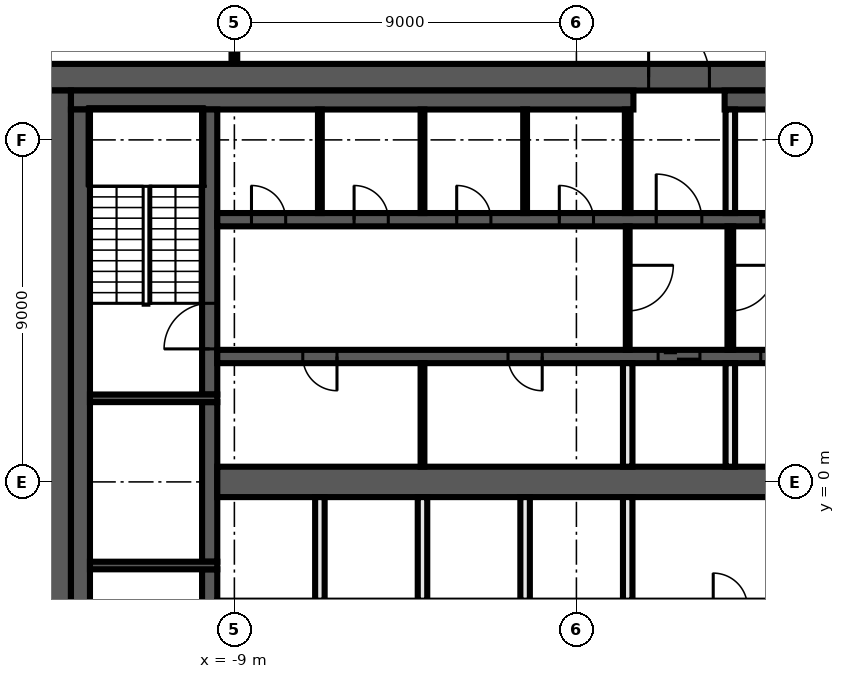
"""IFC4 building model, lengths in metres.
Left out: names, types, materials, properties, quantities, classifications, styles, units other than length and angle.
Written with IfcOpenShell. Run it as: python <this file> out.ifc"""

import sys

from ifc_helpers import new_model, si_unit, direction, frame, frame_2d, origin, place, context, subcontext, project, spatial, rectangle, extrude, element, fill, save


model = new_model("IFC4")
c1 = context("Model", 3, precision=1e-05, world=origin(), true_north=direction((0.0, 1.0)))
c2 = subcontext(c1, "Body", "Model", "MODEL_VIEW")
j1 = project(units=[si_unit("LENGTHUNIT", "METRE"), si_unit("PLANEANGLEUNIT", "RADIAN")], contexts=[c1])
p1 = place(None, origin())
s1 = spatial("IfcSite", under=j1, at=p1, CompositionType="ELEMENT")
p2 = place(p1, origin())
s2 = spatial("IfcBuilding", under=s1, at=p2, CompositionType="ELEMENT")
p3 = place(p2, frame((0.0, 0.0, 249.6)))
s3 = spatial("IfcBuildingStorey", under=s2, at=p3, CompositionType="ELEMENT", Elevation=249.6)
p4 = place(p3, frame((-9.0, 11.0, 0.0), z_axis=(0.0, 0.0, 1.0), x_axis=(0.0, 1.0, 0.0)))
e1 = element("IfcWall", 1, at=p4, inside=s3, PredefinedType="PARTITIONING", context=c2, shape_type="SweptSolid", body=[
    extrude(rectangle(XDim=2.925, YDim=0.15, at=frame_2d((1.462, 0.0))), origin(), (0.0, 0.0, 1.0), 3.82),
])
p5 = place(p3, frame((-14.0, 10.65, 0.0), z_axis=(0.0, 0.0, 1.0), x_axis=(1.0, 0.0, 0.0)))
e2 = element("IfcWall", 2, at=p5, inside=s3, PredefinedType="SHEAR", context=c2, shape_type="SweptSolid", body=[
    extrude(rectangle(XDim=28.0, YDim=0.7, at=frame_2d((14.0, 0.0))), origin(), (0.0, 0.0, 1.0), 3.82),
])
p6 = place(p5, frame((15.9, 0.0, 0.0)))
e3 = element("IfcOpeningElement", 3, at=p6, cuts=e2, PredefinedType="OPENING", context=c2, shape_type="SweptSolid", body=[
    extrude(rectangle(XDim=1.6, YDim=2.1, at=frame_2d((0.8, 1.05))), frame((0.0, 0.36, 0.0), z_axis=(0.0, -1.0, 0.0), x_axis=(1.0, 0.0, 0.0)), (0.0, 0.0, 1.0), 0.72),
])
p7 = place(p3, frame((-13.65, -10.3, 0.0), z_axis=(0.0, 0.0, 1.0), x_axis=(0.0, 1.0, 0.0)))
e4 = element("IfcWall", 4, at=p7, inside=s3, PredefinedType="SHEAR", context=c2, shape_type="SweptSolid", body=[
    extrude(rectangle(XDim=20.6, YDim=0.7, at=frame_2d((10.3, 0.0))), origin(), (0.0, 0.0, 1.0), 3.82),
])
p8 = place(p3, frame((-13.3, 10.05, 0.0), z_axis=(0.0, 0.0, 1.0), x_axis=(1.0, 0.0, 0.0)))
e5 = element("IfcWall", 5, at=p8, inside=s3, PredefinedType="SHEAR", context=c2, shape_type="SweptSolid", body=[
    extrude(rectangle(XDim=14.8, YDim=0.5, at=frame_2d((7.4, 0.0))), origin(), (0.0, 0.0, 1.0), 3.82),
])
p9 = place(p3, frame((3.9, 10.05, 0.0), z_axis=(0.0, 0.0, 1.0), x_axis=(1.0, 0.0, 0.0)))
e6 = element("IfcWall", 6, at=p9, inside=s3, PredefinedType="SHEAR", context=c2, shape_type="SweptSolid", body=[
    extrude(rectangle(XDim=9.4, YDim=0.5, at=frame_2d((4.7, 0.0))), origin(), (0.0, 0.0, 1.0), 3.82),
])
p10 = place(p3, frame((-13.05, -9.8, 0.0), z_axis=(0.0, 0.0, 1.0), x_axis=(0.0, 1.0, 0.0)))
e7 = element("IfcWall", 7, at=p10, inside=s3, PredefinedType="SHEAR", context=c2, shape_type="SweptSolid", body=[
    extrude(rectangle(XDim=19.6, YDim=0.5, at=frame_2d((9.8, 0.0))), origin(), (0.0, 0.0, 1.0), 3.82),
])
p11 = place(p3, frame((-9.65, -9.8, 0.0), z_axis=(0.0, 0.0, 1.0), x_axis=(0.0, 1.0, 0.0)))
e8 = element("IfcWall", 8, at=p11, inside=s3, PredefinedType="SHEAR", context=c2, shape_type="SweptSolid", body=[
    extrude(rectangle(XDim=7.5, YDim=0.4, at=frame_2d((3.75, 0.0))), origin(), (0.0, 0.0, 1.0), 3.82),
])
p12 = place(p11, frame((5.1, 0.0, 0.0)))
e9 = element("IfcOpeningElement", 9, at=p12, cuts=e8, PredefinedType="OPENING", context=c2, shape_type="SweptSolid", body=[
    extrude(rectangle(XDim=1.2, YDim=2.1, at=frame_2d((0.6, 1.05))), frame((0.0, 0.21, 0.0), z_axis=(0.0, -1.0, 0.0), x_axis=(1.0, 0.0, 0.0)), (0.0, 0.0, 1.0), 0.42),
])
p13 = place(p3, frame((-9.65, -2.1, 0.0), z_axis=(0.0, 0.0, 1.0), x_axis=(0.0, 1.0, 0.0)))
e10 = element("IfcWall", 10, at=p13, inside=s3, PredefinedType="SHEAR", context=c2, shape_type="SweptSolid", body=[
    extrude(rectangle(XDim=4.2, YDim=0.4, at=frame_2d((2.1, 0.0))), origin(), (0.0, 0.0, 1.0), 3.82),
])
p14 = place(p3, frame((-9.65, 2.3, 0.0), z_axis=(0.0, 0.0, 1.0), x_axis=(0.0, 1.0, 0.0)))
e11 = element("IfcWall", 11, at=p14, inside=s3, PredefinedType="SHEAR", context=c2, shape_type="SweptSolid", body=[
    extrude(rectangle(XDim=7.5, YDim=0.4, at=frame_2d((3.75, 0.0))), origin(), (0.0, 0.0, 1.0), 3.82),
])
p15 = place(p14, frame((1.2, 0.0, 0.0)))
e12 = element("IfcOpeningElement", 12, at=p15, cuts=e11, PredefinedType="OPENING", context=c2, shape_type="SweptSolid", body=[
    extrude(rectangle(XDim=1.2, YDim=2.1, at=frame_2d((0.6, 1.05))), frame((0.0, 0.21, 0.0), z_axis=(0.0, -1.0, 0.0), x_axis=(1.0, 0.0, 0.0)), (0.0, 0.0, 1.0), 0.42),
])
for number, where, z_axis, x_axis in (
    (13, (-9.45, 2.2, 0.0), (0.0, 0.0, 1.0), (-1.0, 0.0, 0.0)),
    (14, (-9.45, -2.2, 0.0), (0.0, 0.0, 1.0), (-1.0, 0.0, 0.0)),
):
    element("IfcWall", number, at=place(p3, frame(where, z_axis=z_axis, x_axis=x_axis)), inside=s3, PredefinedType="SHEAR", context=c2, shape_type="SweptSolid", body=[
        extrude(rectangle(XDim=3.35, YDim=0.2, at=frame_2d((1.675, 0.0))), origin(), (0.0, 0.0, 1.0), 3.82),
    ])
p16 = place(p3, frame((-9.45, 6.9, 0.0), z_axis=(0.0, 0.0, 1.0), x_axis=(1.0, 0.0, 0.0)))
e15 = element("IfcWall", 15, at=p16, inside=s3, PredefinedType="SHEAR", context=c2, shape_type="SweptSolid", body=[
    extrude(rectangle(XDim=18.9, YDim=0.35, at=frame_2d((9.45, 0.0))), origin(), (0.0, 0.0, 1.0), 3.82),
])
p17 = place(p16, frame((11.55, 0.0, 0.0)))
e16 = element("IfcOpeningElement", 16, at=p17, cuts=e15, PredefinedType="OPENING", context=c2, shape_type="SweptSolid", body=[
    extrude(rectangle(XDim=1.2, YDim=2.1, at=frame_2d((0.6, 1.05))), frame((0.0, 0.185, 0.0), z_axis=(0.0, -1.0, 0.0), x_axis=(1.0, 0.0, 0.0)), (0.0, 0.0, 1.0), 0.37),
])
p18 = place(p16, frame((14.3, 0.0, 0.0)))
e17 = element("IfcOpeningElement", 17, at=p18, cuts=e15, PredefinedType="OPENING", context=c2, shape_type="SweptSolid", body=[
    extrude(rectangle(XDim=1.1, YDim=2.1, at=frame_2d((0.55, 1.05))), frame((0.0, 0.185, 0.0), z_axis=(0.0, -1.0, 0.0), x_axis=(1.0, 0.0, 0.0)), (0.0, 0.0, 1.0), 0.37),
])
p19 = place(p16, frame((17.0, 0.0, 0.0)))
e18 = element("IfcOpeningElement", 18, at=p19, cuts=e15, PredefinedType="OPENING", context=c2, shape_type="SweptSolid", body=[
    extrude(rectangle(XDim=1.1, YDim=2.1, at=frame_2d((0.55, 1.05))), frame((0.0, 0.185, 0.0), z_axis=(0.0, -1.0, 0.0), x_axis=(1.0, 0.0, 0.0)), (0.0, 0.0, 1.0), 0.37),
])
p20 = place(p16, frame((0.9, 0.0, 0.0)))
e19 = element("IfcOpeningElement", 19, at=p20, cuts=e15, PredefinedType="OPENING", context=c2, shape_type="SweptSolid", body=[
    extrude(rectangle(XDim=0.9, YDim=2.1, at=frame_2d((0.45, 1.05))), frame((0.0, 0.185, 0.0), z_axis=(0.0, -1.0, 0.0), x_axis=(1.0, 0.0, 0.0)), (0.0, 0.0, 1.0), 0.37),
])
p21 = place(p16, frame((3.6, 0.0, 0.0)))
e20 = element("IfcOpeningElement", 20, at=p21, cuts=e15, PredefinedType="OPENING", context=c2, shape_type="SweptSolid", body=[
    extrude(rectangle(XDim=0.9, YDim=2.1, at=frame_2d((0.45, 1.05))), frame((0.0, 0.185, 0.0), z_axis=(0.0, -1.0, 0.0), x_axis=(1.0, 0.0, 0.0)), (0.0, 0.0, 1.0), 0.37),
])
p22 = place(p16, frame((6.3, 0.0, 0.0)))
e21 = element("IfcOpeningElement", 21, at=p22, cuts=e15, PredefinedType="OPENING", context=c2, shape_type="SweptSolid", body=[
    extrude(rectangle(XDim=0.9, YDim=2.1, at=frame_2d((0.45, 1.05))), frame((0.0, 0.185, 0.0), z_axis=(0.0, -1.0, 0.0), x_axis=(1.0, 0.0, 0.0)), (0.0, 0.0, 1.0), 0.37),
])
p23 = place(p16, frame((9.0, 0.0, 0.0)))
e22 = element("IfcOpeningElement", 22, at=p23, cuts=e15, PredefinedType="OPENING", context=c2, shape_type="SweptSolid", body=[
    extrude(rectangle(XDim=0.9, YDim=2.1, at=frame_2d((0.45, 1.05))), frame((0.0, 0.185, 0.0), z_axis=(0.0, -1.0, 0.0), x_axis=(1.0, 0.0, 0.0)), (0.0, 0.0, 1.0), 0.37),
])
p24 = place(p3, frame((9.45, 3.3, 0.0), z_axis=(0.0, 0.0, 1.0), x_axis=(-1.0, 0.0, 0.0)))
e23 = element("IfcWall", 23, at=p24, inside=s3, PredefinedType="SHEAR", context=c2, shape_type="SweptSolid", body=[
    extrude(rectangle(XDim=18.9, YDim=0.35, at=frame_2d((9.45, 0.0))), origin(), (0.0, 0.0, 1.0), 3.82),
])
p25 = place(p24, frame((6.2, 0.0, 0.0)))
e24 = element("IfcOpeningElement", 24, at=p25, cuts=e23, PredefinedType="OPENING", context=c2, shape_type="SweptSolid", body=[
    extrude(rectangle(XDim=1.1, YDim=2.1, at=frame_2d((0.55, 1.05))), frame((0.0, 0.185, 0.0), z_axis=(0.0, -1.0, 0.0), x_axis=(1.0, 0.0, 0.0)), (0.0, 0.0, 1.0), 0.37),
])
p26 = place(p24, frame((3.5, 0.0, 0.0)))
e25 = element("IfcOpeningElement", 25, at=p26, cuts=e23, PredefinedType="OPENING", context=c2, shape_type="SweptSolid", body=[
    extrude(rectangle(XDim=1.1, YDim=2.1, at=frame_2d((0.55, 1.05))), frame((0.0, 0.185, 0.0), z_axis=(0.0, -1.0, 0.0), x_axis=(1.0, 0.0, 0.0)), (0.0, 0.0, 1.0), 0.37),
])
p27 = place(p24, frame((0.9, 0.0, 0.0)))
e26 = element("IfcOpeningElement", 26, at=p27, cuts=e23, PredefinedType="OPENING", context=c2, shape_type="SweptSolid", body=[
    extrude(rectangle(XDim=0.9, YDim=2.1, at=frame_2d((0.45, 1.05))), frame((0.0, 0.185, 0.0), z_axis=(0.0, -1.0, 0.0), x_axis=(1.0, 0.0, 0.0)), (0.0, 0.0, 1.0), 0.37),
])
p28 = place(p24, frame((15.75, 0.0, 0.0)))
e27 = element("IfcOpeningElement", 27, at=p28, cuts=e23, PredefinedType="OPENING", context=c2, shape_type="SweptSolid", body=[
    extrude(rectangle(XDim=0.9, YDim=2.1, at=frame_2d((0.45, 1.05))), frame((0.0, 0.185, 0.0), z_axis=(0.0, -1.0, 0.0), x_axis=(1.0, 0.0, 0.0)), (0.0, 0.0, 1.0), 0.37),
])
p29 = place(p24, frame((10.35, 0.0, 0.0)))
e28 = element("IfcOpeningElement", 28, at=p29, cuts=e23, PredefinedType="OPENING", context=c2, shape_type="SweptSolid", body=[
    extrude(rectangle(XDim=0.9, YDim=2.1, at=frame_2d((0.45, 1.05))), frame((0.0, 0.185, 0.0), z_axis=(0.0, -1.0, 0.0), x_axis=(1.0, 0.0, 0.0)), (0.0, 0.0, 1.0), 0.37),
])
p30 = place(p3, frame((-9.45, 0.0, 0.0), z_axis=(0.0, 0.0, 1.0), x_axis=(1.0, 0.0, 0.0)))
e29 = element("IfcWall", 29, at=p30, inside=s3, PredefinedType="SHEAR", context=c2, shape_type="SweptSolid", body=[
    extrude(rectangle(XDim=18.9, YDim=0.8, at=frame_2d((9.45, 0.0))), origin(), (0.0, 0.0, 1.0), 3.82),
])
p31 = place(p3, frame((4.05, 6.725, 0.0), z_axis=(0.0, 0.0, 1.0), x_axis=(0.0, -1.0, 0.0)))
e30 = element("IfcWall", 30, at=p31, inside=s3, PredefinedType="PARTITIONING", context=c2, shape_type="SweptSolid", body=[
    extrude(rectangle(XDim=3.25, YDim=0.15, at=frame_2d((1.625, 0.0))), origin(), (0.0, 0.0, 1.0), 3.82),
])
p32 = place(p31, frame((1.025, 0.0, 0.0)))
e31 = element("IfcOpeningElement", 31, at=p32, cuts=e30, PredefinedType="OPENING", context=c2, shape_type="SweptSolid", body=[
    extrude(rectangle(XDim=1.2, YDim=2.1, at=frame_2d((0.6, 1.05))), frame((0.0, 0.085, 0.0), z_axis=(0.0, -1.0, 0.0), x_axis=(1.0, 0.0, 0.0)), (0.0, 0.0, 1.0), 0.17),
])
for number, where, z_axis, x_axis in (
    (32, (4.05, 0.4, 0.0), (0.0, 0.0, 1.0), (0.0, 1.0, 0.0)),
    (33, (4.05, 7.075, 0.0), (0.0, 0.0, 1.0), (0.0, 1.0, 0.0)),
):
    element("IfcWall", number, at=place(p3, frame(where, z_axis=z_axis, x_axis=x_axis)), inside=s3, PredefinedType="SOLIDWALL", context=c2, shape_type="SweptSolid", body=[
        extrude(rectangle(XDim=2.725, YDim=0.25, at=frame_2d((1.363, 0.0))), origin(), (0.0, 0.0, 1.0), 3.82),
    ])
p33 = place(p3, frame((1.35, 7.075, 0.0), z_axis=(0.0, 0.0, 1.0), x_axis=(0.0, 1.0, 0.0)))
e34 = element("IfcWall", 34, at=p33, inside=s3, PredefinedType="PARTITIONING", context=c2, shape_type="SweptSolid", body=[
    extrude(rectangle(XDim=2.725, YDim=0.15, at=frame_2d((1.363, 0.0))), origin(), (0.0, 0.0, 1.0), 3.82),
])
p34 = place(p3, frame((1.35, 6.725, 0.0), z_axis=(0.0, 0.0, 1.0), x_axis=(0.0, -1.0, 0.0)))
e35 = element("IfcWall", 35, at=p34, inside=s3, PredefinedType="PARTITIONING", context=c2, shape_type="SweptSolid", body=[
    extrude(rectangle(XDim=3.25, YDim=0.1, at=frame_2d((1.625, 0.0))), origin(), (0.0, 0.0, 1.0), 3.82),
])
p35 = place(p34, frame((1.025, 0.0, 0.0)))
e36 = element("IfcOpeningElement", 36, at=p35, cuts=e35, PredefinedType="OPENING", context=c2, shape_type="SweptSolid", body=[
    extrude(rectangle(XDim=1.2, YDim=2.1, at=frame_2d((0.6, 1.05))), frame((0.0, 0.06, 0.0), z_axis=(0.0, -1.0, 0.0), x_axis=(1.0, 0.0, 0.0)), (0.0, 0.0, 1.0), 0.12),
])
for number, where, z_axis, x_axis in (
    (37, (1.35, -3.125, 0.0), (0.0, 0.0, 1.0), (0.0, 1.0, 0.0)),
    (38, (1.35, 0.4, 0.0), (0.0, 0.0, 1.0), (0.0, 1.0, 0.0)),
):
    element("IfcWall", number, at=place(p3, frame(where, z_axis=z_axis, x_axis=x_axis)), inside=s3, PredefinedType="SOLIDWALL", context=c2, shape_type="SweptSolid", body=[
        extrude(rectangle(XDim=2.725, YDim=0.25, at=frame_2d((1.363, 0.0))), origin(), (0.0, 0.0, 1.0), 3.82),
    ])
p36 = place(p3, frame((-1.35, 7.075, 0.0), z_axis=(0.0, 0.0, 1.0), x_axis=(0.0, 1.0, 0.0)))
e39 = element("IfcWall", 39, at=p36, inside=s3, PredefinedType="PARTITIONING", context=c2, shape_type="SweptSolid", body=[
    extrude(rectangle(XDim=2.725, YDim=0.1, at=frame_2d((1.363, 0.0))), origin(), (0.0, 0.0, 1.0), 3.82),
])
p37 = place(p3, frame((-1.35, -3.125, 0.0), z_axis=(0.0, 0.0, 1.0), x_axis=(0.0, 1.0, 0.0)))
e40 = element("IfcWall", 40, at=p37, inside=s3, PredefinedType="SOLIDWALL", context=c2, shape_type="SweptSolid", body=[
    extrude(rectangle(XDim=2.725, YDim=0.25, at=frame_2d((1.363, 0.0))), origin(), (0.0, 0.0, 1.0), 3.82),
])
for number, where, z_axis, x_axis in (
    (41, (-4.05, 0.4, 0.0), (0.0, 0.0, 1.0), (0.0, 1.0, 0.0)),
    (42, (-4.05, 7.075, 0.0), (0.0, 0.0, 1.0), (0.0, 1.0, 0.0)),
):
    element("IfcWall", number, at=place(p3, frame(where, z_axis=z_axis, x_axis=x_axis)), inside=s3, PredefinedType="PARTITIONING", context=c2, shape_type="SweptSolid", body=[
        extrude(rectangle(XDim=2.725, YDim=0.1, at=frame_2d((1.363, 0.0))), origin(), (0.0, 0.0, 1.0), 3.82),
    ])
p38 = place(p3, frame((-4.05, -3.125, 0.0), z_axis=(0.0, 0.0, 1.0), x_axis=(0.0, 1.0, 0.0)))
e43 = element("IfcWall", 43, at=p38, inside=s3, PredefinedType="SOLIDWALL", context=c2, shape_type="SweptSolid", body=[
    extrude(rectangle(XDim=2.725, YDim=0.25, at=frame_2d((1.363, 0.0))), origin(), (0.0, 0.0, 1.0), 3.82),
])
p39 = place(p3, frame((-6.75, 7.075, 0.0), z_axis=(0.0, 0.0, 1.0), x_axis=(0.0, 1.0, 0.0)))
e44 = element("IfcWall", 44, at=p39, inside=s3, PredefinedType="PARTITIONING", context=c2, shape_type="SweptSolid", body=[
    extrude(rectangle(XDim=2.725, YDim=0.1, at=frame_2d((1.363, 0.0))), origin(), (0.0, 0.0, 1.0), 3.82),
])
p40 = place(p3, frame((-6.75, -3.125, 0.0), z_axis=(0.0, 0.0, 1.0), x_axis=(0.0, 1.0, 0.0)))
e45 = element("IfcWall", 45, at=p40, inside=s3, PredefinedType="SOLIDWALL", context=c2, shape_type="SweptSolid", body=[
    extrude(rectangle(XDim=2.725, YDim=0.25, at=frame_2d((1.363, 0.0))), origin(), (0.0, 0.0, 1.0), 3.82),
])
p41 = place(p6, origin())
e46 = element("IfcDoor", 46, at=p41, inside=s3, OperationType="DOUBLE_DOOR_SINGLE_SWING", PredefinedType="DOOR", context=c2, shape_type="SweptSolid", body=[
    extrude(rectangle(XDim=1.6, YDim=2.1, at=frame_2d((0.8, 1.05))), frame((0.0, 0.025, 0.0), z_axis=(0.0, -1.0, 0.0), x_axis=(1.0, 0.0, 0.0)), (0.0, 0.0, 1.0), 0.05),
])
fill(e3, e46)
p42 = place(p17, origin())
e47 = element("IfcDoor", 47, at=p42, inside=s3, OperationType="SINGLE_SWING_LEFT", PredefinedType="DOOR", context=c2, shape_type="SweptSolid", body=[
    extrude(rectangle(XDim=1.2, YDim=2.1, at=frame_2d((0.6, 1.05))), frame((0.0, 0.025, 0.0), z_axis=(0.0, -1.0, 0.0), x_axis=(1.0, 0.0, 0.0)), (0.0, 0.0, 1.0), 0.05),
])
fill(e16, e47)
p43 = place(p18, origin())
e48 = element("IfcDoor", 48, at=p43, inside=s3, OperationType="DOUBLE_DOOR_SLIDING", PredefinedType="DOOR", context=c2, shape_type="SweptSolid", body=[
    extrude(rectangle(XDim=1.1, YDim=2.1, at=frame_2d((0.55, 1.05))), frame((0.0, 0.025, 0.0), z_axis=(0.0, -1.0, 0.0), x_axis=(1.0, 0.0, 0.0)), (0.0, 0.0, 1.0), 0.05),
])
fill(e17, e48)
p44 = place(p25, origin())
e49 = element("IfcDoor", 49, at=p44, inside=s3, OperationType="DOUBLE_DOOR_SLIDING", PredefinedType="DOOR", context=c2, shape_type="SweptSolid", body=[
    extrude(rectangle(XDim=1.1, YDim=2.1, at=frame_2d((0.55, 1.05))), frame((0.0, 0.025, 0.0), z_axis=(0.0, -1.0, 0.0), x_axis=(1.0, 0.0, 0.0)), (0.0, 0.0, 1.0), 0.05),
])
fill(e24, e49)
p45 = place(p26, origin())
e50 = element("IfcDoor", 50, at=p45, inside=s3, OperationType="DOUBLE_DOOR_SLIDING", PredefinedType="DOOR", context=c2, shape_type="SweptSolid", body=[
    extrude(rectangle(XDim=1.1, YDim=2.1, at=frame_2d((0.55, 1.05))), frame((0.0, 0.025, 0.0), z_axis=(0.0, -1.0, 0.0), x_axis=(1.0, 0.0, 0.0)), (0.0, 0.0, 1.0), 0.05),
])
fill(e25, e50)
p46 = place(p20, origin())
e51 = element("IfcDoor", 51, at=p46, inside=s3, OperationType="SINGLE_SWING_RIGHT", PredefinedType="DOOR", context=c2, shape_type="SweptSolid", body=[
    extrude(rectangle(XDim=0.9, YDim=2.1, at=frame_2d((0.45, 1.05))), frame((0.0, 0.025, 0.0), z_axis=(0.0, -1.0, 0.0), x_axis=(1.0, 0.0, 0.0)), (0.0, 0.0, 1.0), 0.05),
])
fill(e19, e51)
p47 = place(p21, origin())
e52 = element("IfcDoor", 52, at=p47, inside=s3, OperationType="SINGLE_SWING_LEFT", PredefinedType="DOOR", context=c2, shape_type="SweptSolid", body=[
    extrude(rectangle(XDim=0.9, YDim=2.1, at=frame_2d((0.45, 1.05))), frame((0.0, 0.025, 0.0), z_axis=(0.0, -1.0, 0.0), x_axis=(1.0, 0.0, 0.0)), (0.0, 0.0, 1.0), 0.05),
])
fill(e20, e52)
p48 = place(p22, origin())
e53 = element("IfcDoor", 53, at=p48, inside=s3, OperationType="SINGLE_SWING_RIGHT", PredefinedType="DOOR", context=c2, shape_type="SweptSolid", body=[
    extrude(rectangle(XDim=0.9, YDim=2.1, at=frame_2d((0.45, 1.05))), frame((0.0, 0.025, 0.0), z_axis=(0.0, -1.0, 0.0), x_axis=(1.0, 0.0, 0.0)), (0.0, 0.0, 1.0), 0.05),
])
fill(e21, e53)
p49 = place(p23, origin())
e54 = element("IfcDoor", 54, at=p49, inside=s3, OperationType="SINGLE_SWING_LEFT", PredefinedType="DOOR", context=c2, shape_type="SweptSolid", body=[
    extrude(rectangle(XDim=0.9, YDim=2.1, at=frame_2d((0.45, 1.05))), frame((0.0, 0.025, 0.0), z_axis=(0.0, -1.0, 0.0), x_axis=(1.0, 0.0, 0.0)), (0.0, 0.0, 1.0), 0.05),
])
fill(e22, e54)
p50 = place(p28, origin())
e55 = element("IfcDoor", 55, at=p50, inside=s3, OperationType="SINGLE_SWING_RIGHT", PredefinedType="DOOR", context=c2, shape_type="SweptSolid", body=[
    extrude(rectangle(XDim=0.9, YDim=2.1, at=frame_2d((0.45, 1.05))), frame((0.0, 0.025, 0.0), z_axis=(0.0, -1.0, 0.0), x_axis=(1.0, 0.0, 0.0)), (0.0, 0.0, 1.0), 0.05),
])
fill(e27, e55)
p51 = place(p29, origin())
e56 = element("IfcDoor", 56, at=p51, inside=s3, OperationType="SINGLE_SWING_LEFT", PredefinedType="DOOR", context=c2, shape_type="SweptSolid", body=[
    extrude(rectangle(XDim=0.9, YDim=2.1, at=frame_2d((0.45, 1.05))), frame((0.0, 0.025, 0.0), z_axis=(0.0, -1.0, 0.0), x_axis=(1.0, 0.0, 0.0)), (0.0, 0.0, 1.0), 0.05),
])
fill(e28, e56)
p52 = place(p15, origin())
e57 = element("IfcDoor", 57, at=p52, inside=s3, OperationType="SINGLE_SWING_RIGHT", PredefinedType="DOOR", context=c2, shape_type="SweptSolid", body=[
    extrude(rectangle(XDim=1.2, YDim=2.1, at=frame_2d((0.6, 1.05))), frame((0.0, 0.025, 0.0), z_axis=(0.0, -1.0, 0.0), x_axis=(1.0, 0.0, 0.0)), (0.0, 0.0, 1.0), 0.05),
])
fill(e12, e57)
p53 = place(p35, origin())
e58 = element("IfcDoor", 58, at=p53, inside=s3, OperationType="SINGLE_SWING_LEFT", PredefinedType="DOOR", context=c2, shape_type="SweptSolid", body=[
    extrude(rectangle(XDim=1.2, YDim=2.1, at=frame_2d((0.6, 1.05))), frame((0.0, 0.025, 0.0), z_axis=(0.0, -1.0, 0.0), x_axis=(1.0, 0.0, 0.0)), (0.0, 0.0, 1.0), 0.05),
])
fill(e36, e58)
p54 = place(p32, origin())
e59 = element("IfcDoor", 59, at=p54, inside=s3, OperationType="SINGLE_SWING_RIGHT", PredefinedType="DOOR", context=c2, shape_type="SweptSolid", body=[
    extrude(rectangle(XDim=1.2, YDim=2.1, at=frame_2d((0.6, 1.05))), frame((0.0, 0.025, 0.0), z_axis=(0.0, -1.0, 0.0), x_axis=(1.0, 0.0, 0.0)), (0.0, 0.0, 1.0), 0.05),
])
fill(e31, e59)
save(model, sys.argv[1])
